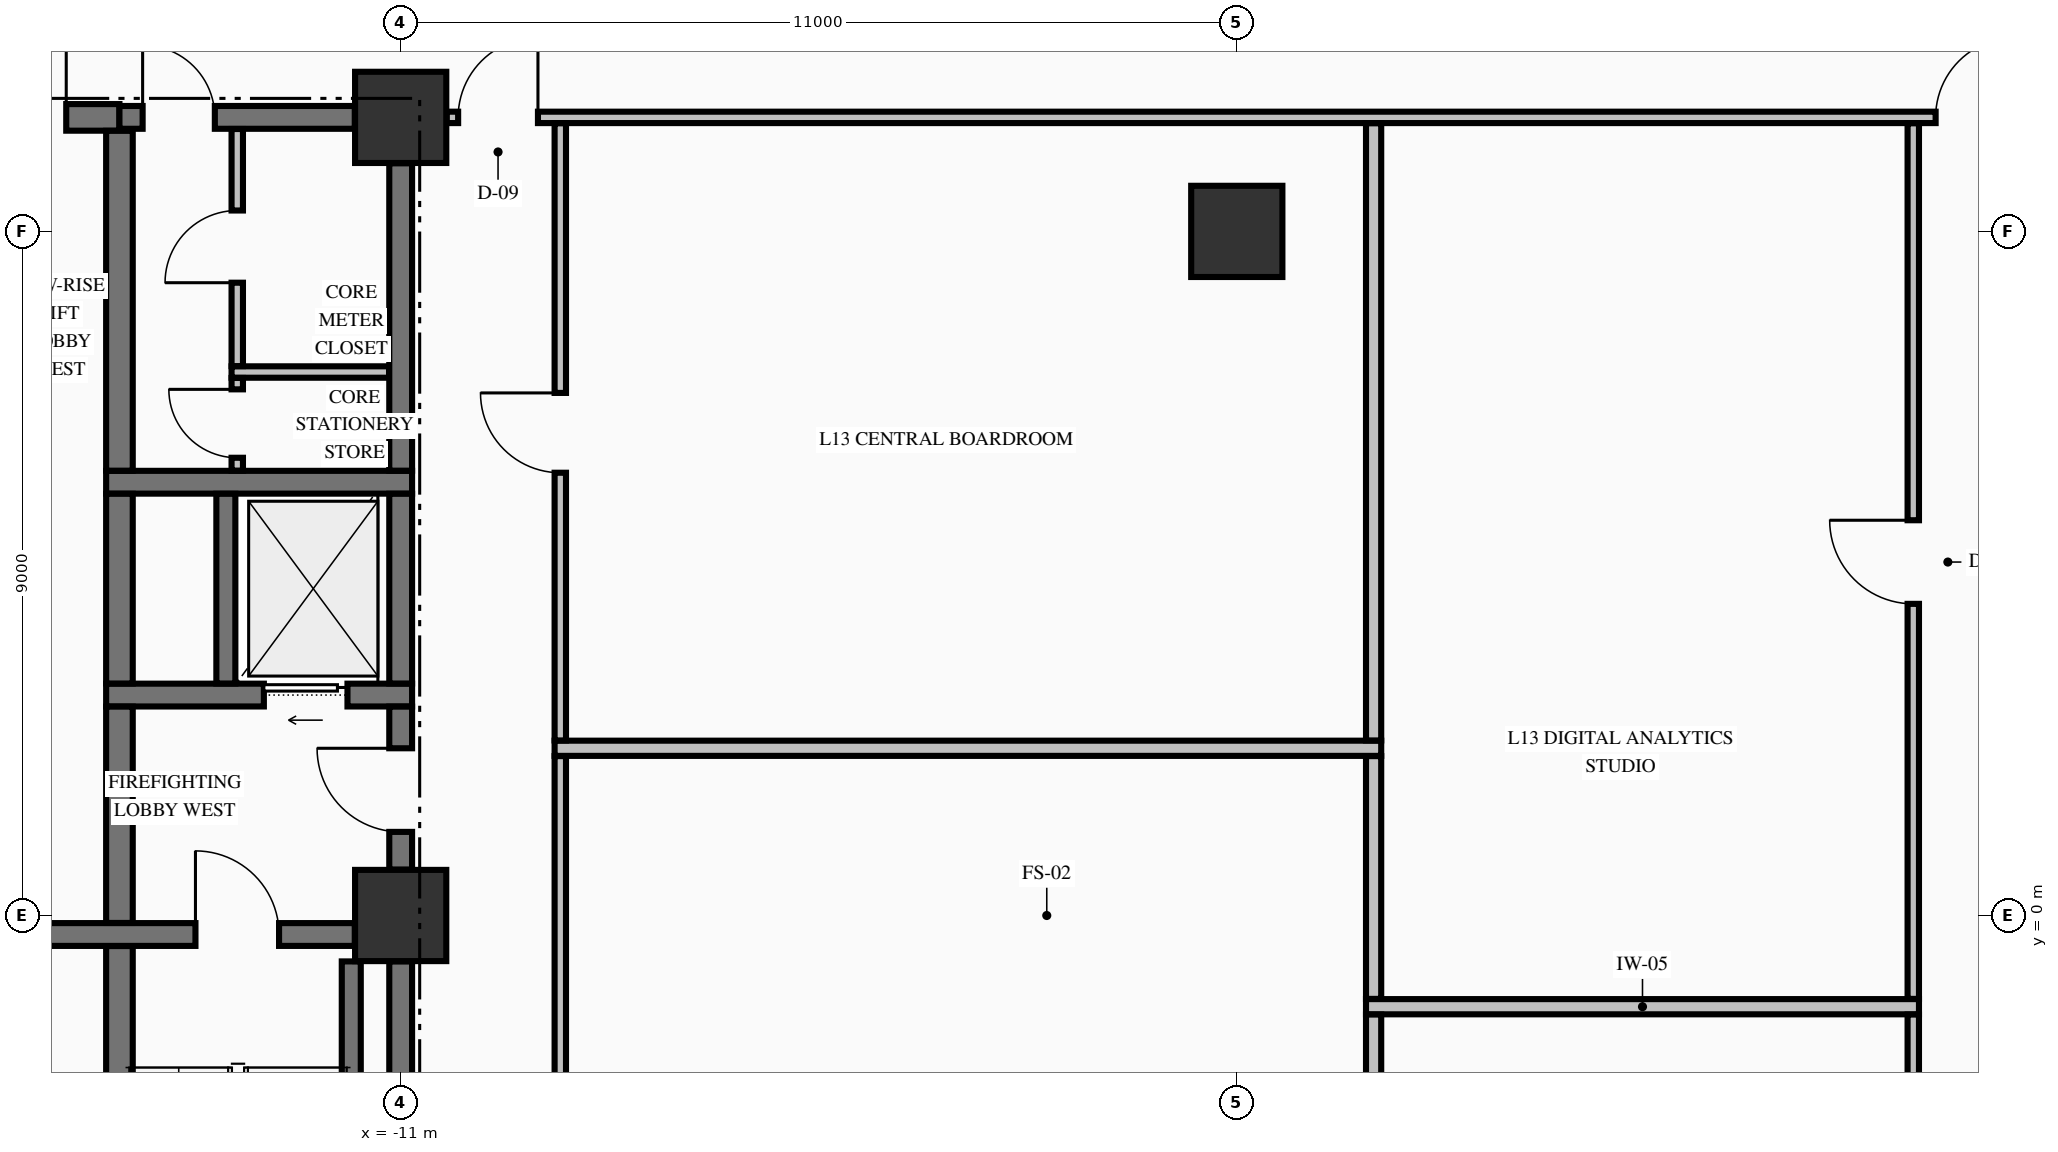
"""IFC4 building model, lengths in metres.
Left out: names, types, materials, properties, quantities, classifications, styles, units other than length and angle.
Written with IfcOpenShell. Run it as: python <this file> out.ifc"""

import sys

from ifc_helpers import new_model, si_unit, direction, frame, frame_2d, origin, origin_2d, place, context, subcontext, project, spatial, rectangle, extrude, element, fill, save


model = new_model("IFC4")
c1 = context("Model", 3, precision=1e-05, world=origin(), true_north=direction((0.0, 1.0)))
c2 = subcontext(c1, "Body", "Model", "MODEL_VIEW")
j1 = project(units=[si_unit("LENGTHUNIT", "METRE"), si_unit("PLANEANGLEUNIT", "RADIAN")], contexts=[c1])
p1 = place(None, origin())
s1 = spatial("IfcSite", under=j1, at=p1, CompositionType="ELEMENT")
p2 = place(p1, origin())
s2 = spatial("IfcBuilding", under=s1, at=p2, CompositionType="ELEMENT")
p3 = place(p2, frame((0.0, 0.0, 57.19)))
s3 = spatial("IfcBuildingStorey", under=s2, at=p3, CompositionType="ELEMENT", Elevation=57.19)
for number, where, z_axis, x_axis in (
    (1, (-11.0, 0.0, -0.425), (0.0, 0.0, 1.0), (1.0, 0.0, 0.0)),
    (2, (-11.0, 10.5, -0.425), (0.0, 0.0, 1.0), (1.0, 0.0, 0.0)),
    (3, (0.0, 9.0, -0.425), (0.0, 0.0, 1.0), (1.0, 0.0, 0.0)),
):
    element("IfcColumn", number, at=place(p3, frame(where, z_axis=z_axis, x_axis=x_axis)), inside=s3, PredefinedType="COLUMN", context=c2, shape_type="SweptSolid", body=[
        extrude(rectangle(XDim=1.2, YDim=1.2, at=origin_2d()), origin(), (0.0, 0.0, 1.0), 3.695),
    ])
p4 = place(p3, frame((-19.396, -0.25, 0.0), z_axis=(0.0, 0.0, 1.0), x_axis=(1.0, 0.0, 0.0)))
e4 = element("IfcWall", 4, at=p4, inside=s3, PredefinedType="SHEAR", context=c2, shape_type="SweptSolid", body=[
    extrude(rectangle(XDim=7.792, YDim=0.3, at=frame_2d((3.896, 0.0))), origin(), (0.0, 0.0, 1.0), 3.27),
])
p5 = place(p4, frame((5.696, 0.0, 0.0)))
e5 = element("IfcOpeningElement", 5, at=p5, cuts=e4, PredefinedType="OPENING", context=c2, shape_type="SweptSolid", body=[
    extrude(rectangle(XDim=1.1, YDim=2.15, at=frame_2d((0.55, 1.075))), frame((0.0, 0.16, 0.0), z_axis=(0.0, -1.0, 0.0), x_axis=(1.0, 0.0, 0.0)), (0.0, 0.0, 1.0), 0.32),
])
p6 = place(p3, frame((-14.875, 2.9, 0.0), z_axis=(0.0, 0.0, 1.0), x_axis=(1.0, 0.0, 0.0)))
e6 = element("IfcWall", 6, at=p6, inside=s3, PredefinedType="SHEAR", context=c2, shape_type="SweptSolid", body=[
    extrude(rectangle(XDim=4.025, YDim=0.3, at=frame_2d((2.012, 0.0))), origin(), (0.0, 0.0, 1.0), 3.27),
])
p7 = place(p6, frame((2.075, 0.0, 0.0)))
e7 = element("IfcOpeningElement", 7, at=p7, cuts=e6, PredefinedType="OPENING", context=c2, shape_type="SweptSolid", body=[
    extrude(rectangle(XDim=1.1, YDim=2.2, at=frame_2d((0.55, 1.1))), frame((0.0, 0.16, 0.0), z_axis=(0.0, -1.0, 0.0), x_axis=(1.0, 0.0, 0.0)), (0.0, 0.0, 1.0), 0.32),
])
p8 = place(p3, frame((-14.875, 5.7, 0.0), z_axis=(0.0, 0.0, 1.0), x_axis=(1.0, 0.0, 0.0)))
e8 = element("IfcWall", 8, at=p8, inside=s3, PredefinedType="SHEAR", context=c2, shape_type="SweptSolid", body=[
    extrude(rectangle(XDim=4.025, YDim=0.3, at=frame_2d((2.012, 0.0))), origin(), (0.0, 0.0, 1.0), 3.27),
])
p9 = place(p3, frame((-19.396, 10.5, 0.0), z_axis=(0.0, 0.0, 1.0), x_axis=(1.0, 0.0, 0.0)))
e9 = element("IfcWall", 9, at=p9, inside=s3, PredefinedType="SHEAR", context=c2, shape_type="SweptSolid", body=[
    extrude(rectangle(XDim=4.696, YDim=0.35, at=frame_2d((2.348, 0.0))), origin(), (0.0, 0.0, 1.0), 3.27),
])
p10 = place(p9, frame((2.796, 0.0, 0.0)))
e10 = element("IfcOpeningElement", 10, at=p10, cuts=e9, PredefinedType="OPENING", context=c2, shape_type="SweptSolid", body=[
    extrude(rectangle(XDim=1.2, YDim=2.15, at=frame_2d((0.6, 1.075))), frame((0.0, 0.185, 0.0), z_axis=(0.0, -1.0, 0.0), x_axis=(1.0, 0.0, 0.0)), (0.0, 0.0, 1.0), 0.37),
])
p11 = place(p3, frame((-14.7, 10.5, 0.0), z_axis=(0.0, 0.0, 1.0), x_axis=(1.0, 0.0, 0.0)))
e11 = element("IfcWall", 11, at=p11, inside=s3, PredefinedType="SHEAR", context=c2, shape_type="SweptSolid", body=[
    extrude(rectangle(XDim=3.096, YDim=0.3, at=frame_2d((1.548, 0.0))), origin(), (0.0, 0.0, 1.0), 3.27),
])
p12 = place(p11, frame((0.305, 0.0, 0.0)))
e12 = element("IfcOpeningElement", 12, at=p12, cuts=e11, PredefinedType="OPENING", context=c2, shape_type="SweptSolid", body=[
    extrude(rectangle(XDim=0.95, YDim=2.15, at=frame_2d((0.475, 1.075))), frame((0.0, 0.16, 0.0), z_axis=(0.0, -1.0, 0.0), x_axis=(1.0, 0.0, 0.0)), (0.0, 0.0, 1.0), 0.32),
])
p13 = place(p3, frame((1.7, -1.2, 0.0), z_axis=(0.0, 0.0, 1.0), x_axis=(1.0, 0.0, 0.0)))
e13 = element("IfcWall", 13, at=p13, inside=s3, PredefinedType="PARTITIONING", context=c2, shape_type="SweptSolid", body=[
    extrude(rectangle(XDim=7.275, YDim=0.2, at=frame_2d((3.638, 0.0))), origin(), (0.0, 0.0, 1.0), 3.27),
])
p14 = place(p3, frame((-8.975, 2.2, 0.0), z_axis=(0.0, 0.0, 1.0), x_axis=(1.0, 0.0, 0.0)))
e14 = element("IfcWall", 14, at=p14, inside=s3, PredefinedType="PARTITIONING", context=c2, shape_type="SweptSolid", body=[
    extrude(rectangle(XDim=10.875, YDim=0.2, at=frame_2d((5.438, 0.0))), origin(), (0.0, 0.0, 1.0), 3.27),
])
p15 = place(p3, frame((-13.225, 7.15, 0.0), z_axis=(0.0, 0.0, 1.0), x_axis=(1.0, 0.0, 0.0)))
e15 = element("IfcWall", 15, at=p15, inside=s3, PredefinedType="PARTITIONING", context=c2, shape_type="SweptSolid", body=[
    extrude(rectangle(XDim=2.072, YDim=0.15, at=frame_2d((1.036, 0.0))), origin(), (0.0, 0.0, 1.0), 3.27),
])
p16 = place(p3, frame((-10.394, 10.5, 0.0), z_axis=(0.0, 0.0, 1.0), x_axis=(1.0, 0.0, 0.0)))
e16 = element("IfcWall", 16, at=p16, inside=s3, PredefinedType="PARTITIONING", context=c2, shape_type="SweptSolid", body=[
    extrude(rectangle(XDim=20.788, YDim=0.15, at=frame_2d((10.394, 0.0))), origin(), (0.0, 0.0, 1.0), 3.27),
])
p17 = place(p16, frame((0.15, 0.0, 0.0)))
e17 = element("IfcOpeningElement", 17, at=p17, cuts=e16, PredefinedType="OPENING", context=c2, shape_type="SweptSolid", body=[
    extrude(rectangle(XDim=1.05, YDim=2.15, at=frame_2d((0.525, 1.075))), frame((0.0, 0.085, 0.0), z_axis=(0.0, -1.0, 0.0), x_axis=(1.0, 0.0, 0.0)), (0.0, 0.0, 1.0), 0.17),
])
p18 = place(p16, frame((19.588, 0.0, 0.0)))
e18 = element("IfcOpeningElement", 18, at=p18, cuts=e16, PredefinedType="OPENING", context=c2, shape_type="SweptSolid", body=[
    extrude(rectangle(XDim=1.05, YDim=2.15, at=frame_2d((0.525, 1.075))), frame((0.0, 0.085, 0.0), z_axis=(0.0, -1.0, 0.0), x_axis=(1.0, 0.0, 0.0)), (0.0, 0.0, 1.0), 0.17),
])
p19 = place(p3, frame((-14.7, -9.773, 0.0), z_axis=(0.0, 0.0, 1.0), x_axis=(0.0, 1.0, 0.0)))
e19 = element("IfcWall", 19, at=p19, inside=s3, PredefinedType="SHEAR", context=c2, shape_type="SweptSolid", body=[
    extrude(rectangle(XDim=9.371, YDim=0.35, at=frame_2d((4.686, 0.0))), origin(), (0.0, 0.0, 1.0), 3.27),
])
p20 = place(p3, frame((-14.7, -0.098, 0.0), z_axis=(0.0, 0.0, 1.0), x_axis=(0.0, 1.0, 0.0)))
e20 = element("IfcWall", 20, at=p20, inside=s3, PredefinedType="SHEAR", context=c2, shape_type="SweptSolid", body=[
    extrude(rectangle(XDim=2.846, YDim=0.35, at=frame_2d((1.423, 0.0))), origin(), (0.0, 0.0, 1.0), 3.27),
])
p21 = place(p3, frame((-14.7, 3.052, 0.0), z_axis=(0.0, 0.0, 1.0), x_axis=(0.0, 1.0, 0.0)))
e21 = element("IfcWall", 21, at=p21, inside=s3, PredefinedType="SHEAR", context=c2, shape_type="SweptSolid", body=[
    extrude(rectangle(XDim=2.496, YDim=0.35, at=frame_2d((1.248, 0.0))), origin(), (0.0, 0.0, 1.0), 3.27),
])
p22 = place(p3, frame((-14.7, 5.852, 0.0), z_axis=(0.0, 0.0, 1.0), x_axis=(0.0, 1.0, 0.0)))
e22 = element("IfcWall", 22, at=p22, inside=s3, PredefinedType="SHEAR", context=c2, shape_type="SweptSolid", body=[
    extrude(rectangle(XDim=4.471, YDim=0.35, at=frame_2d((2.235, 0.0))), origin(), (0.0, 0.0, 1.0), 3.27),
])
p23 = place(p3, frame((-13.3, 3.052, 0.0), z_axis=(0.0, 0.0, 1.0), x_axis=(0.0, 1.0, 0.0)))
e23 = element("IfcWall", 23, at=p23, inside=s3, PredefinedType="SOLIDWALL", context=c2, shape_type="SweptSolid", body=[
    extrude(rectangle(XDim=2.496, YDim=0.25, at=frame_2d((1.248, 0.0))), origin(), (0.0, 0.0, 1.0), 3.27),
])
p24 = place(p3, frame((-11.65, -9.346, 0.0), z_axis=(0.0, 0.0, 1.0), x_axis=(0.0, 1.0, 0.0)))
e24 = element("IfcWall", 24, at=p24, inside=s3, PredefinedType="SOLIDWALL", context=c2, shape_type="SweptSolid", body=[
    extrude(rectangle(XDim=8.742, YDim=0.25, at=frame_2d((4.371, 0.0))), origin(), (0.0, 0.0, 1.0), 3.27),
])
p25 = place(p3, frame((-11.0, -9.346, 0.0), z_axis=(0.0, 0.0, 1.0), x_axis=(0.0, 1.0, 0.0)))
e25 = element("IfcWall", 25, at=p25, inside=s3, PredefinedType="SHEAR", context=c2, shape_type="SweptSolid", body=[
    extrude(rectangle(XDim=8.742, YDim=0.3, at=frame_2d((4.371, 0.0))), origin(), (0.0, 0.0, 1.0), 3.27),
])
p26 = place(p3, frame((-11.0, 0.604, 0.0), z_axis=(0.0, 0.0, 1.0), x_axis=(0.0, 1.0, 0.0)))
e26 = element("IfcWall", 26, at=p26, inside=s3, PredefinedType="SHEAR", context=c2, shape_type="SweptSolid", body=[
    extrude(rectangle(XDim=2.144, YDim=0.3, at=frame_2d((1.072, 0.0))), origin(), (0.0, 0.0, 1.0), 3.27),
])
p27 = place(p26, frame((0.496, 0.0, 0.0)))
e27 = element("IfcOpeningElement", 27, at=p27, cuts=e26, PredefinedType="OPENING", context=c2, shape_type="SweptSolid", body=[
    extrude(rectangle(XDim=1.1, YDim=2.15, at=frame_2d((0.55, 1.075))), frame((0.0, 0.16, 0.0), z_axis=(0.0, -1.0, 0.0), x_axis=(1.0, 0.0, 0.0)), (0.0, 0.0, 1.0), 0.32),
])
p28 = place(p3, frame((-11.0, 3.052, 0.0), z_axis=(0.0, 0.0, 1.0), x_axis=(0.0, 1.0, 0.0)))
e28 = element("IfcWall", 28, at=p28, inside=s3, PredefinedType="SHEAR", context=c2, shape_type="SweptSolid", body=[
    extrude(rectangle(XDim=2.496, YDim=0.3, at=frame_2d((1.248, 0.0))), origin(), (0.0, 0.0, 1.0), 3.27),
])
p29 = place(p3, frame((-11.0, 5.852, 0.0), z_axis=(0.0, 0.0, 1.0), x_axis=(0.0, 1.0, 0.0)))
e29 = element("IfcWall", 29, at=p29, inside=s3, PredefinedType="SHEAR", context=c2, shape_type="SweptSolid", body=[
    extrude(rectangle(XDim=4.044, YDim=0.3, at=frame_2d((2.022, 0.0))), origin(), (0.0, 0.0, 1.0), 3.27),
])
p30 = place(p3, frame((-13.15, 5.853, 0.0), z_axis=(0.0, 0.0, 1.0), x_axis=(0.0, 1.0, 0.0)))
e30 = element("IfcWall", 30, at=p30, inside=s3, PredefinedType="PARTITIONING", context=c2, shape_type="SweptSolid", body=[
    extrude(rectangle(XDim=1.219, YDim=0.15, at=frame_2d((0.609, 0.0))), origin(), (0.0, 0.0, 1.0), 3.27),
])
p31 = place(p30, frame((0.169, 0.0, 0.0)))
e31 = element("IfcOpeningElement", 31, at=p31, cuts=e30, PredefinedType="OPENING", context=c2, shape_type="SweptSolid", body=[
    extrude(rectangle(XDim=0.9, YDim=2.15, at=frame_2d((0.45, 1.075))), frame((0.0, 0.085, 0.0), z_axis=(0.0, -1.0, 0.0), x_axis=(1.0, 0.0, 0.0)), (0.0, 0.0, 1.0), 0.17),
])
p32 = place(p3, frame((-13.15, 7.228, 0.0), z_axis=(0.0, 0.0, 1.0), x_axis=(0.0, 1.0, 0.0)))
e32 = element("IfcWall", 32, at=p32, inside=s3, PredefinedType="PARTITIONING", context=c2, shape_type="SweptSolid", body=[
    extrude(rectangle(XDim=3.119, YDim=0.15, at=frame_2d((1.56, 0.0))), origin(), (0.0, 0.0, 1.0), 3.27),
])
p33 = place(p32, frame((1.097, 0.0, 0.0)))
e33 = element("IfcOpeningElement", 33, at=p33, cuts=e32, PredefinedType="OPENING", context=c2, shape_type="SweptSolid", body=[
    extrude(rectangle(XDim=0.95, YDim=2.15, at=frame_2d((0.475, 1.075))), frame((0.0, 0.085, 0.0), z_axis=(0.0, -1.0, 0.0), x_axis=(1.0, 0.0, 0.0)), (0.0, 0.0, 1.0), 0.17),
])
p34 = place(p3, frame((-8.9, -9.872, 0.0), z_axis=(0.0, 0.0, 1.0), x_axis=(0.0, 1.0, 0.0)))
e34 = element("IfcWall", 34, at=p34, inside=s3, PredefinedType="PARTITIONING", context=c2, shape_type="SweptSolid", body=[
    extrude(rectangle(XDim=11.969, YDim=0.15, at=frame_2d((5.984, 0.0))), origin(), (0.0, 0.0, 1.0), 3.27),
])
p35 = place(p34, frame((5.527, 0.0, 0.0)))
e35 = element("IfcOpeningElement", 35, at=p35, cuts=e34, PredefinedType="OPENING", context=c2, shape_type="SweptSolid", body=[
    extrude(rectangle(XDim=0.95, YDim=2.15, at=frame_2d((0.475, 1.075))), frame((0.0, 0.085, 0.0), z_axis=(0.0, -1.0, 0.0), x_axis=(1.0, 0.0, 0.0)), (0.0, 0.0, 1.0), 0.17),
])
p36 = place(p3, frame((-8.9, 2.303, 0.0), z_axis=(0.0, 0.0, 1.0), x_axis=(0.0, 1.0, 0.0)))
e36 = element("IfcWall", 36, at=p36, inside=s3, PredefinedType="PARTITIONING", context=c2, shape_type="SweptSolid", body=[
    extrude(rectangle(XDim=8.119, YDim=0.15, at=frame_2d((4.06, 0.0))), origin(), (0.0, 0.0, 1.0), 3.27),
])
p37 = place(p36, frame((3.522, 0.0, 0.0)))
e37 = element("IfcOpeningElement", 37, at=p37, cuts=e36, PredefinedType="OPENING", context=c2, shape_type="SweptSolid", body=[
    extrude(rectangle(XDim=1.05, YDim=2.15, at=frame_2d((0.525, 1.075))), frame((0.0, 0.085, 0.0), z_axis=(0.0, -1.0, 0.0), x_axis=(1.0, 0.0, 0.0)), (0.0, 0.0, 1.0), 0.17),
])
p38 = place(p3, frame((1.8, -4.697, 0.0), z_axis=(0.0, 0.0, 1.0), x_axis=(0.0, 1.0, 0.0)))
e38 = element("IfcWall", 38, at=p38, inside=s3, PredefinedType="PARTITIONING", context=c2, shape_type="SweptSolid", body=[
    extrude(rectangle(XDim=3.394, YDim=0.2, at=frame_2d((1.697, 0.0))), origin(), (0.0, 0.0, 1.0), 3.27),
])
p39 = place(p3, frame((1.8, -1.097, 0.0), z_axis=(0.0, 0.0, 1.0), x_axis=(0.0, 1.0, 0.0)))
e39 = element("IfcWall", 39, at=p39, inside=s3, PredefinedType="PARTITIONING", context=c2, shape_type="SweptSolid", body=[
    extrude(rectangle(XDim=3.194, YDim=0.2, at=frame_2d((1.597, 0.0))), origin(), (0.0, 0.0, 1.0), 3.27),
])
p40 = place(p3, frame((1.8, 2.303, 0.0), z_axis=(0.0, 0.0, 1.0), x_axis=(0.0, 1.0, 0.0)))
e40 = element("IfcWall", 40, at=p40, inside=s3, PredefinedType="PARTITIONING", context=c2, shape_type="SweptSolid", body=[
    extrude(rectangle(XDim=8.119, YDim=0.2, at=frame_2d((4.06, 0.0))), origin(), (0.0, 0.0, 1.0), 3.27),
])
p41 = place(p3, frame((8.9, -4.697, 0.0), z_axis=(0.0, 0.0, 1.0), x_axis=(0.0, 1.0, 0.0)))
e41 = element("IfcWall", 41, at=p41, inside=s3, PredefinedType="PARTITIONING", context=c2, shape_type="SweptSolid", body=[
    extrude(rectangle(XDim=3.394, YDim=0.15, at=frame_2d((1.697, 0.0))), origin(), (0.0, 0.0, 1.0), 3.27),
])
p42 = place(p41, frame((1.222, 0.0, 0.0)))
e42 = element("IfcOpeningElement", 42, at=p42, cuts=e41, PredefinedType="OPENING", context=c2, shape_type="SweptSolid", body=[
    extrude(rectangle(XDim=0.95, YDim=2.15, at=frame_2d((0.475, 1.075))), frame((0.0, 0.085, 0.0), z_axis=(0.0, -1.0, 0.0), x_axis=(1.0, 0.0, 0.0)), (0.0, 0.0, 1.0), 0.17),
])
p43 = place(p3, frame((8.9, -1.097, 0.0), z_axis=(0.0, 0.0, 1.0), x_axis=(0.0, 1.0, 0.0)))
e43 = element("IfcWall", 43, at=p43, inside=s3, PredefinedType="PARTITIONING", context=c2, shape_type="SweptSolid", body=[
    extrude(rectangle(XDim=11.519, YDim=0.15, at=frame_2d((5.76, 0.0))), origin(), (0.0, 0.0, 1.0), 3.27),
])
p44 = place(p43, frame((5.197, 0.0, 0.0)))
e44 = element("IfcOpeningElement", 44, at=p44, cuts=e43, PredefinedType="OPENING", context=c2, shape_type="SweptSolid", body=[
    extrude(rectangle(XDim=1.1, YDim=2.15, at=frame_2d((0.55, 1.075))), frame((0.0, 0.085, 0.0), z_axis=(0.0, -1.0, 0.0), x_axis=(1.0, 0.0, 0.0)), (0.0, 0.0, 1.0), 0.17),
])
p45 = place(p5, origin())
e45 = element("IfcDoor", 45, at=p45, inside=s3, OperationType="SINGLE_SWING_LEFT", PredefinedType="DOOR", context=c2, shape_type="SweptSolid", body=[
    extrude(rectangle(XDim=1.1, YDim=2.15, at=frame_2d((0.55, 1.075))), frame((0.0, 0.025, 0.0), z_axis=(0.0, -1.0, 0.0), x_axis=(1.0, 0.0, 0.0)), (0.0, 0.0, 1.0), 0.05),
])
fill(e5, e45)
p46 = place(p27, origin())
e46 = element("IfcDoor", 46, at=p46, inside=s3, OperationType="SINGLE_SWING_RIGHT", PredefinedType="DOOR", context=c2, shape_type="SweptSolid", body=[
    extrude(rectangle(XDim=1.1, YDim=2.15, at=frame_2d((0.55, 1.075))), frame((0.0, 0.025, 0.0), z_axis=(0.0, -1.0, 0.0), x_axis=(1.0, 0.0, 0.0)), (0.0, 0.0, 1.0), 0.05),
])
fill(e27, e46)
p47 = place(p7, origin())
e47 = element("IfcDoor", 47, at=p47, inside=s3, OperationType="SLIDING_TO_LEFT", PredefinedType="DOOR", context=c2, shape_type="SweptSolid", body=[
    extrude(rectangle(XDim=1.1, YDim=2.2, at=frame_2d((0.55, 1.1))), frame((0.0, 0.025, 0.0), z_axis=(0.0, -1.0, 0.0), x_axis=(1.0, 0.0, 0.0)), (0.0, 0.0, 1.0), 0.05),
])
fill(e7, e47)
p48 = place(p12, origin())
e48 = element("IfcDoor", 48, at=p48, inside=s3, OperationType="SINGLE_SWING_LEFT", PredefinedType="DOOR", context=c2, shape_type="SweptSolid", body=[
    extrude(rectangle(XDim=0.95, YDim=2.15, at=frame_2d((0.475, 1.075))), frame((0.0, 0.025, 0.0), z_axis=(0.0, -1.0, 0.0), x_axis=(1.0, 0.0, 0.0)), (0.0, 0.0, 1.0), 0.05),
])
fill(e12, e48)
p49 = place(p31, origin())
e49 = element("IfcDoor", 49, at=p49, inside=s3, OperationType="SINGLE_SWING_RIGHT", PredefinedType="DOOR", context=c2, shape_type="SweptSolid", body=[
    extrude(rectangle(XDim=0.9, YDim=2.15, at=frame_2d((0.45, 1.075))), frame((0.0, 0.025, 0.0), z_axis=(0.0, -1.0, 0.0), x_axis=(1.0, 0.0, 0.0)), (0.0, 0.0, 1.0), 0.05),
])
fill(e31, e49)
p50 = place(p33, origin())
e50 = element("IfcDoor", 50, at=p50, inside=s3, OperationType="SINGLE_SWING_LEFT", PredefinedType="DOOR", context=c2, shape_type="SweptSolid", body=[
    extrude(rectangle(XDim=0.95, YDim=2.15, at=frame_2d((0.475, 1.075))), frame((0.0, 0.025, 0.0), z_axis=(0.0, -1.0, 0.0), x_axis=(1.0, 0.0, 0.0)), (0.0, 0.0, 1.0), 0.05),
])
fill(e33, e50)
p51 = place(p10, origin())
e51 = element("IfcDoor", 51, at=p51, inside=s3, OperationType="SINGLE_SWING_RIGHT", PredefinedType="DOOR", context=c2, shape_type="SweptSolid", body=[
    extrude(rectangle(XDim=1.2, YDim=2.15, at=frame_2d((0.6, 1.075))), frame((0.0, 0.025, 0.0), z_axis=(0.0, -1.0, 0.0), x_axis=(1.0, 0.0, 0.0)), (0.0, 0.0, 1.0), 0.05),
])
fill(e10, e51)
p52 = place(p17, origin())
e52 = element("IfcDoor", 52, at=p52, inside=s3, OperationType="SINGLE_SWING_RIGHT", PredefinedType="DOOR", context=c2, shape_type="SweptSolid", body=[
    extrude(rectangle(XDim=1.05, YDim=2.15, at=frame_2d((0.525, 1.075))), frame((0.0, 0.025, 0.0), z_axis=(0.0, -1.0, 0.0), x_axis=(1.0, 0.0, 0.0)), (0.0, 0.0, 1.0), 0.05),
])
fill(e17, e52)
p53 = place(p18, origin())
e53 = element("IfcDoor", 53, at=p53, inside=s3, OperationType="SINGLE_SWING_RIGHT", PredefinedType="DOOR", context=c2, shape_type="SweptSolid", body=[
    extrude(rectangle(XDim=1.05, YDim=2.15, at=frame_2d((0.525, 1.075))), frame((0.0, 0.025, 0.0), z_axis=(0.0, -1.0, 0.0), x_axis=(1.0, 0.0, 0.0)), (0.0, 0.0, 1.0), 0.05),
])
fill(e18, e53)
p54 = place(p37, origin())
e54 = element("IfcDoor", 54, at=p54, inside=s3, OperationType="SINGLE_SWING_RIGHT", PredefinedType="DOOR", context=c2, shape_type="SweptSolid", body=[
    extrude(rectangle(XDim=1.05, YDim=2.15, at=frame_2d((0.525, 1.075))), frame((0.0, 0.025, 0.0), z_axis=(0.0, -1.0, 0.0), x_axis=(1.0, 0.0, 0.0)), (0.0, 0.0, 1.0), 0.05),
])
fill(e37, e54)
p55 = place(p44, origin())
e55 = element("IfcDoor", 55, at=p55, inside=s3, OperationType="SINGLE_SWING_RIGHT", PredefinedType="DOOR", context=c2, shape_type="SweptSolid", body=[
    extrude(rectangle(XDim=1.1, YDim=2.15, at=frame_2d((0.55, 1.075))), frame((0.0, 0.025, 0.0), z_axis=(0.0, -1.0, 0.0), x_axis=(1.0, 0.0, 0.0)), (0.0, 0.0, 1.0), 0.05),
])
fill(e44, e55)
save(model, sys.argv[1])
